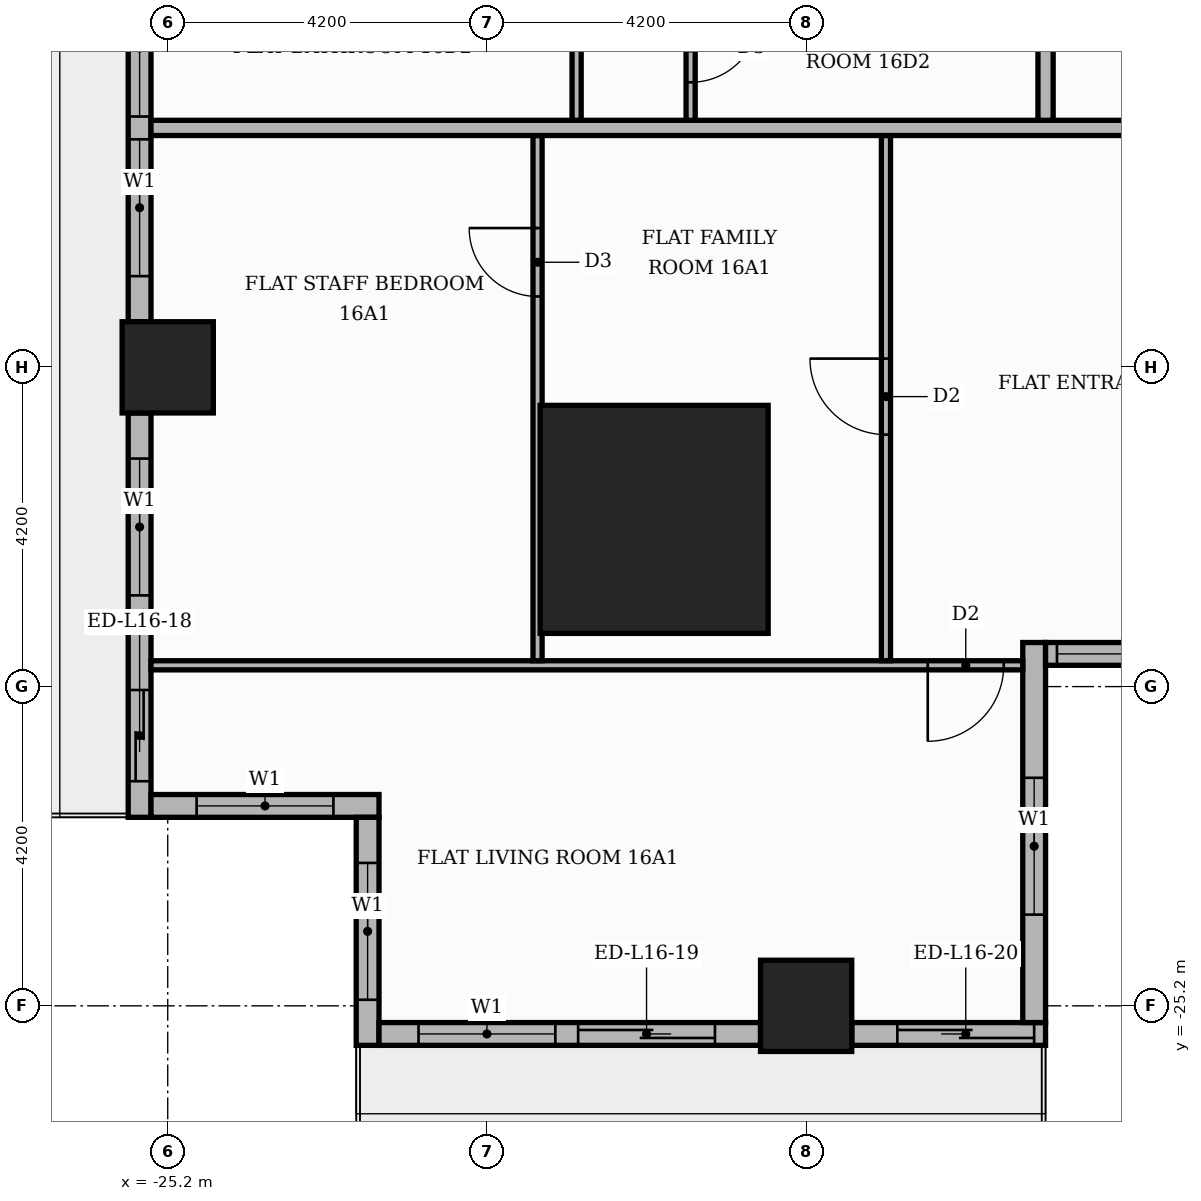
"""IFC4 building model, lengths in metres.
Left out: names, types, materials, properties, quantities, classifications, styles, units other than length and angle.
Written with IfcOpenShell. Run it as: python <this file> out.ifc"""

import sys

from ifc_helpers import new_model, si_unit, direction, frame, frame_2d, origin, origin_2d, place, context, subcontext, project, spatial, rectangle, extrude, element, fill, save


model = new_model("IFC4")
c1 = context("Model", 3, precision=1e-05, world=origin(), true_north=direction((0.0, 1.0)))
c2 = subcontext(c1, "Body", "Model", "MODEL_VIEW")
j1 = project(units=[si_unit("LENGTHUNIT", "METRE"), si_unit("PLANEANGLEUNIT", "RADIAN")], contexts=[c1])
p1 = place(None, origin())
s1 = spatial("IfcSite", under=j1, at=p1, CompositionType="ELEMENT")
p2 = place(p1, origin())
s2 = spatial("IfcBuilding", under=s1, at=p2, CompositionType="ELEMENT")
p3 = place(p2, frame((0.0, 0.0, 69.9)))
s3 = spatial("IfcBuildingStorey", under=s2, at=p3, CompositionType="ELEMENT", Elevation=69.9)
p4 = place(p3, frame((-18.8, -18.8, 0.0), z_axis=(0.0, 0.0, 1.0), x_axis=(1.0, 0.0, 0.0)))
e1 = element("IfcColumn", 1, at=p4, inside=s3, PredefinedType="COLUMN", context=c2, shape_type="SweptSolid", body=[
    extrude(rectangle(XDim=3.0, YDim=3.0, at=origin_2d()), origin(), (0.0, 0.0, 1.0), 3.9),
])
for number, where, z_axis, x_axis in (
    (2, (-16.8, -25.2, 0.0), (0.0, 0.0, 1.0), (1.0, 0.0, 0.0)),
    (3, (-25.2, -16.8, 0.0), (0.0, 0.0, 1.0), (1.0, 0.0, 0.0)),
):
    element("IfcColumn", number, at=place(p3, frame(where, z_axis=z_axis, x_axis=x_axis)), inside=s3, PredefinedType="COLUMN", context=c2, shape_type="SweptSolid", body=[
        extrude(rectangle(XDim=1.2, YDim=1.2, at=origin_2d()), origin(), (0.0, 0.0, 1.0), 3.9),
    ])
p5 = place(p3, frame((-25.57, -9.0, 0.0), z_axis=(0.0, 0.0, 1.0), x_axis=(0.0, -1.0, 0.0)))
e4 = element("IfcWall", 4, at=p5, inside=s3, PredefinedType="STANDARD", context=c2, shape_type="SweptSolid", body=[
    extrude(rectangle(XDim=7.2, YDim=0.3, at=frame_2d((3.6, 0.0))), origin(), (0.0, 0.0, 1.0), 3.4),
])
p6 = place(p5, frame((0.6, 0.0, 0.9)))
e5 = element("IfcOpeningElement", 5, at=p6, cuts=e4, PredefinedType="OPENING", context=c2, shape_type="SweptSolid", body=[
    extrude(rectangle(XDim=1.8, YDim=2.1, at=frame_2d((0.9, 1.05))), frame((0.0, 0.16, 0.0), z_axis=(0.0, -1.0, 0.0), x_axis=(1.0, 0.0, 0.0)), (0.0, 0.0, 1.0), 0.32),
])
p7 = place(p5, frame((2.7, 0.0, 0.9)))
e6 = element("IfcOpeningElement", 6, at=p7, cuts=e4, PredefinedType="OPENING", context=c2, shape_type="SweptSolid", body=[
    extrude(rectangle(XDim=1.8, YDim=2.1, at=frame_2d((0.9, 1.05))), frame((0.0, 0.16, 0.0), z_axis=(0.0, -1.0, 0.0), x_axis=(1.0, 0.0, 0.0)), (0.0, 0.0, 1.0), 0.32),
])
p8 = place(p5, frame((4.8, 0.0, 0.9)))
e7 = element("IfcOpeningElement", 7, at=p8, cuts=e4, PredefinedType="OPENING", context=c2, shape_type="SweptSolid", body=[
    extrude(rectangle(XDim=1.8, YDim=2.1, at=frame_2d((0.9, 1.05))), frame((0.0, 0.16, 0.0), z_axis=(0.0, -1.0, 0.0), x_axis=(1.0, 0.0, 0.0)), (0.0, 0.0, 1.0), 0.32),
])
p9 = place(p3, frame((-25.57, -17.4, 0.0), z_axis=(0.0, 0.0, 1.0), x_axis=(0.0, -1.0, 0.0)))
e8 = element("IfcWall", 8, at=p9, inside=s3, PredefinedType="STANDARD", context=c2, shape_type="SweptSolid", body=[
    extrude(rectangle(XDim=5.32, YDim=0.3, at=frame_2d((2.66, 0.0))), origin(), (0.0, 0.0, 1.0), 3.4),
])
p10 = place(p9, frame((0.6, 0.0, 0.9)))
e9 = element("IfcOpeningElement", 9, at=p10, cuts=e8, PredefinedType="OPENING", context=c2, shape_type="SweptSolid", body=[
    extrude(rectangle(XDim=1.8, YDim=2.1, at=frame_2d((0.9, 1.05))), frame((0.0, 0.16, 0.0), z_axis=(0.0, -1.0, 0.0), x_axis=(1.0, 0.0, 0.0)), (0.0, 0.0, 1.0), 0.32),
])
p11 = place(p9, frame((3.645, 0.0, 0.0)))
e10 = element("IfcOpeningElement", 10, at=p11, cuts=e8, PredefinedType="OPENING", context=c2, shape_type="SweptSolid", body=[
    extrude(rectangle(XDim=1.2, YDim=2.4, at=frame_2d((0.6, 1.2))), frame((0.0, 0.16, 0.0), z_axis=(0.0, -1.0, 0.0), x_axis=(1.0, 0.0, 0.0)), (0.0, 0.0, 1.0), 0.32),
])
p12 = place(p3, frame((-25.42, -22.57, 0.0), z_axis=(0.0, 0.0, 1.0), x_axis=(1.0, 0.0, 0.0)))
e11 = element("IfcWall", 11, at=p12, inside=s3, PredefinedType="STANDARD", context=c2, shape_type="SweptSolid", body=[
    extrude(rectangle(XDim=3.0, YDim=0.3, at=frame_2d((1.5, 0.0))), origin(), (0.0, 0.0, 1.0), 3.4),
])
p13 = place(p12, frame((0.6, 0.0, 0.9)))
e12 = element("IfcOpeningElement", 12, at=p13, cuts=e11, PredefinedType="OPENING", context=c2, shape_type="SweptSolid", body=[
    extrude(rectangle(XDim=1.8, YDim=2.1, at=frame_2d((0.9, 1.05))), frame((0.0, 0.16, 0.0), z_axis=(0.0, -1.0, 0.0), x_axis=(1.0, 0.0, 0.0)), (0.0, 0.0, 1.0), 0.32),
])
p14 = place(p3, frame((-22.57, -22.72, 0.0), z_axis=(0.0, 0.0, 1.0), x_axis=(0.0, -1.0, 0.0)))
e13 = element("IfcWall", 13, at=p14, inside=s3, PredefinedType="STANDARD", context=c2, shape_type="SweptSolid", body=[
    extrude(rectangle(XDim=3.0, YDim=0.3, at=frame_2d((1.5, 0.0))), origin(), (0.0, 0.0, 1.0), 3.4),
])
p15 = place(p14, frame((0.6, 0.0, 0.9)))
e14 = element("IfcOpeningElement", 14, at=p15, cuts=e13, PredefinedType="OPENING", context=c2, shape_type="SweptSolid", body=[
    extrude(rectangle(XDim=1.8, YDim=2.1, at=frame_2d((0.9, 1.05))), frame((0.0, 0.16, 0.0), z_axis=(0.0, -1.0, 0.0), x_axis=(1.0, 0.0, 0.0)), (0.0, 0.0, 1.0), 0.32),
])
p16 = place(p3, frame((-22.42, -25.57, 0.0), z_axis=(0.0, 0.0, 1.0), x_axis=(1.0, 0.0, 0.0)))
e15 = element("IfcWall", 15, at=p16, inside=s3, PredefinedType="STANDARD", context=c2, shape_type="SweptSolid", body=[
    extrude(rectangle(XDim=5.02, YDim=0.3, at=frame_2d((2.51, 0.0))), origin(), (0.0, 0.0, 1.0), 3.4),
])
p17 = place(p16, frame((0.52, 0.0, 0.9)))
e16 = element("IfcOpeningElement", 16, at=p17, cuts=e15, PredefinedType="OPENING", context=c2, shape_type="SweptSolid", body=[
    extrude(rectangle(XDim=1.8, YDim=2.1, at=frame_2d((0.9, 1.05))), frame((0.0, 0.16, 0.0), z_axis=(0.0, -1.0, 0.0), x_axis=(1.0, 0.0, 0.0)), (0.0, 0.0, 1.0), 0.32),
])
p18 = place(p16, frame((2.62, 0.0, 0.0)))
e17 = element("IfcOpeningElement", 17, at=p18, cuts=e15, PredefinedType="OPENING", context=c2, shape_type="SweptSolid", body=[
    extrude(rectangle(XDim=1.8, YDim=2.4, at=frame_2d((0.9, 1.2))), frame((0.0, 0.16, 0.0), z_axis=(0.0, -1.0, 0.0), x_axis=(1.0, 0.0, 0.0)), (0.0, 0.0, 1.0), 0.32),
])
p19 = place(p3, frame((-16.2, -25.57, 0.0), z_axis=(0.0, 0.0, 1.0), x_axis=(1.0, 0.0, 0.0)))
e18 = element("IfcWall", 18, at=p19, inside=s3, PredefinedType="STANDARD", context=c2, shape_type="SweptSolid", body=[
    extrude(rectangle(XDim=2.55, YDim=0.3, at=frame_2d((1.275, 0.0))), origin(), (0.0, 0.0, 1.0), 3.4),
])
p20 = place(p19, frame((0.6, 0.0, 0.0)))
e19 = element("IfcOpeningElement", 19, at=p20, cuts=e18, PredefinedType="OPENING", context=c2, shape_type="SweptSolid", body=[
    extrude(rectangle(XDim=1.8, YDim=2.4, at=frame_2d((0.9, 1.2))), frame((0.0, 0.16, 0.0), z_axis=(0.0, -1.0, 0.0), x_axis=(1.0, 0.0, 0.0)), (0.0, 0.0, 1.0), 0.32),
])
p21 = place(p3, frame((-13.8, -25.42, 0.0), z_axis=(0.0, 0.0, 1.0), x_axis=(0.0, 1.0, 0.0)))
e20 = element("IfcWall", 20, at=p21, inside=s3, PredefinedType="STANDARD", context=c2, shape_type="SweptSolid", body=[
    extrude(rectangle(XDim=5.0, YDim=0.3, at=frame_2d((2.5, 0.0))), origin(), (0.0, 0.0, 1.0), 3.4),
])
p22 = place(p21, frame((1.42, 0.0, 0.9)))
e21 = element("IfcOpeningElement", 21, at=p22, cuts=e20, PredefinedType="OPENING", context=c2, shape_type="SweptSolid", body=[
    extrude(rectangle(XDim=1.8, YDim=2.1, at=frame_2d((0.9, 1.05))), frame((0.0, 0.16, 0.0), z_axis=(0.0, -1.0, 0.0), x_axis=(1.0, 0.0, 0.0)), (0.0, 0.0, 1.0), 0.32),
])
p23 = place(p3, frame((-13.65, -20.57, 0.0), z_axis=(0.0, 0.0, 1.0), x_axis=(1.0, 0.0, 0.0)))
e22 = element("IfcWall", 22, at=p23, inside=s3, PredefinedType="STANDARD", context=c2, shape_type="SweptSolid", body=[
    extrude(rectangle(XDim=27.6, YDim=0.3, at=frame_2d((13.8, 0.0))), origin(), (0.0, 0.0, 1.0), 3.4),
])
p24 = place(p23, frame((0.15, 0.0, 0.9)))
e23 = element("IfcOpeningElement", 23, at=p24, cuts=e22, PredefinedType="OPENING", context=c2, shape_type="SweptSolid", body=[
    extrude(rectangle(XDim=6.0, YDim=2.1, at=frame_2d((3.0, 1.05))), frame((0.0, 0.16, 0.0), z_axis=(0.0, -1.0, 0.0), x_axis=(1.0, 0.0, 0.0)), (0.0, 0.0, 1.0), 0.32),
])
p25 = place(p23, frame((6.45, 0.0, 0.9)))
e24 = element("IfcOpeningElement", 24, at=p25, cuts=e22, PredefinedType="OPENING", context=c2, shape_type="SweptSolid", body=[
    extrude(rectangle(XDim=1.8, YDim=2.1, at=frame_2d((0.9, 1.05))), frame((0.0, 0.16, 0.0), z_axis=(0.0, -1.0, 0.0), x_axis=(1.0, 0.0, 0.0)), (0.0, 0.0, 1.0), 0.32),
])
p26 = place(p23, frame((8.55, 0.0, 0.9)))
e25 = element("IfcOpeningElement", 25, at=p26, cuts=e22, PredefinedType="OPENING", context=c2, shape_type="SweptSolid", body=[
    extrude(rectangle(XDim=6.0, YDim=2.1, at=frame_2d((3.0, 1.05))), frame((0.0, 0.16, 0.0), z_axis=(0.0, -1.0, 0.0), x_axis=(1.0, 0.0, 0.0)), (0.0, 0.0, 1.0), 0.32),
])
p27 = place(p23, frame((14.85, 0.0, 0.9)))
e26 = element("IfcOpeningElement", 26, at=p27, cuts=e22, PredefinedType="OPENING", context=c2, shape_type="SweptSolid", body=[
    extrude(rectangle(XDim=6.0, YDim=2.1, at=frame_2d((3.0, 1.05))), frame((0.0, 0.16, 0.0), z_axis=(0.0, -1.0, 0.0), x_axis=(1.0, 0.0, 0.0)), (0.0, 0.0, 1.0), 0.32),
])
p28 = place(p23, frame((21.15, 0.0, 0.9)))
e27 = element("IfcOpeningElement", 27, at=p28, cuts=e22, PredefinedType="OPENING", context=c2, shape_type="SweptSolid", body=[
    extrude(rectangle(XDim=6.0, YDim=2.1, at=frame_2d((3.0, 1.05))), frame((0.0, 0.16, 0.0), z_axis=(0.0, -1.0, 0.0), x_axis=(1.0, 0.0, 0.0)), (0.0, 0.0, 1.0), 0.32),
])
p29 = place(p3, frame((-25.42, -20.72, 0.0), z_axis=(0.0, 0.0, 1.0), x_axis=(1.0, 0.0, 0.0)))
e28 = element("IfcWall", 28, at=p29, inside=s3, PredefinedType="PARTITIONING", context=c2, shape_type="SweptSolid", body=[
    extrude(rectangle(XDim=11.47, YDim=0.12, at=frame_2d((5.735, 0.0))), origin(), (0.0, 0.0, 1.0), 3.4),
])
p30 = place(p29, frame((10.22, 0.0, 0.0)))
e29 = element("IfcOpeningElement", 29, at=p30, cuts=e28, PredefinedType="OPENING", context=c2, shape_type="SweptSolid", body=[
    extrude(rectangle(XDim=1.0, YDim=2.1, at=frame_2d((0.5, 1.05))), frame((0.0, 0.07, 0.0), z_axis=(0.0, -1.0, 0.0), x_axis=(1.0, 0.0, 0.0)), (0.0, 0.0, 1.0), 0.14),
])
p31 = place(p3, frame((-20.334, -20.66, 0.0), z_axis=(0.0, 0.0, 1.0), x_axis=(0.0, 1.0, 0.0)))
e30 = element("IfcWall", 30, at=p31, inside=s3, PredefinedType="PARTITIONING", context=c2, shape_type="SweptSolid", body=[
    extrude(rectangle(XDim=6.91, YDim=0.12, at=frame_2d((3.455, 0.0))), origin(), (0.0, 0.0, 1.0), 3.4),
])
p32 = place(p31, frame((4.792, 0.0, 0.0)))
e31 = element("IfcOpeningElement", 31, at=p32, cuts=e30, PredefinedType="OPENING", context=c2, shape_type="SweptSolid", body=[
    extrude(rectangle(XDim=0.9, YDim=2.1, at=frame_2d((0.45, 1.05))), frame((0.0, 0.07, 0.0), z_axis=(0.0, -1.0, 0.0), x_axis=(1.0, 0.0, 0.0)), (0.0, 0.0, 1.0), 0.14),
])
p33 = place(p3, frame((-15.75, -20.66, 0.0), z_axis=(0.0, 0.0, 1.0), x_axis=(0.0, 1.0, 0.0)))
e32 = element("IfcWall", 32, at=p33, inside=s3, PredefinedType="PARTITIONING", context=c2, shape_type="SweptSolid", body=[
    extrude(rectangle(XDim=6.91, YDim=0.12, at=frame_2d((3.455, 0.0))), origin(), (0.0, 0.0, 1.0), 3.4),
])
p34 = place(p33, frame((2.975, 0.0, 0.0)))
e33 = element("IfcOpeningElement", 33, at=p34, cuts=e32, PredefinedType="OPENING", context=c2, shape_type="SweptSolid", body=[
    extrude(rectangle(XDim=1.0, YDim=2.1, at=frame_2d((0.5, 1.05))), frame((0.0, 0.07, 0.0), z_axis=(0.0, -1.0, 0.0), x_axis=(1.0, 0.0, 0.0)), (0.0, 0.0, 1.0), 0.14),
])
p35 = place(p3, frame((-25.42, -13.65, 0.0), z_axis=(0.0, 0.0, 1.0), x_axis=(1.0, 0.0, 0.0)))
e34 = element("IfcWall", 34, at=p35, inside=s3, PredefinedType="PARTITIONING", context=c2, shape_type="SweptSolid", body=[
    extrude(rectangle(XDim=39.07, YDim=0.2, at=frame_2d((19.535, 0.0))), origin(), (0.0, 0.0, 1.0), 3.4),
])
p36 = place(p35, frame((13.32, 0.0, 0.0)))
e35 = element("IfcOpeningElement", 35, at=p36, cuts=e34, PredefinedType="OPENING", context=c2, shape_type="SweptSolid", body=[
    extrude(rectangle(XDim=1.1, YDim=2.4, at=frame_2d((0.55, 1.2))), frame((0.0, 0.11, 0.0), z_axis=(0.0, -1.0, 0.0), x_axis=(1.0, 0.0, 0.0)), (0.0, 0.0, 1.0), 0.22),
])
p37 = place(p35, frame((21.72, 0.0, 0.0)))
e36 = element("IfcOpeningElement", 36, at=p37, cuts=e34, PredefinedType="OPENING", context=c2, shape_type="SweptSolid", body=[
    extrude(rectangle(XDim=1.1, YDim=2.4, at=frame_2d((0.55, 1.2))), frame((0.0, 0.11, 0.0), z_axis=(0.0, -1.0, 0.0), x_axis=(1.0, 0.0, 0.0)), (0.0, 0.0, 1.0), 0.22),
])
p38 = place(p3, frame((-19.82, -13.55, 0.0), z_axis=(0.0, 0.0, 1.0), x_axis=(0.0, 1.0, 0.0)))
e37 = element("IfcWall", 37, at=p38, inside=s3, PredefinedType="PARTITIONING", context=c2, shape_type="SweptSolid", body=[
    extrude(rectangle(XDim=1.94, YDim=0.12, at=frame_2d((0.97, 0.0))), origin(), (0.0, 0.0, 1.0), 3.4),
])
p39 = place(p3, frame((-18.32, -13.55, 0.0), z_axis=(0.0, 0.0, 1.0), x_axis=(0.0, 1.0, 0.0)))
e38 = element("IfcWall", 38, at=p39, inside=s3, PredefinedType="PARTITIONING", context=c2, shape_type="SweptSolid", body=[
    extrude(rectangle(XDim=1.94, YDim=0.12, at=frame_2d((0.97, 0.0))), origin(), (0.0, 0.0, 1.0), 3.4),
])
p40 = place(p39, frame((0.5, 0.0, 0.0)))
e39 = element("IfcOpeningElement", 39, at=p40, cuts=e38, PredefinedType="OPENING", context=c2, shape_type="SweptSolid", body=[
    extrude(rectangle(XDim=0.9, YDim=2.1, at=frame_2d((0.45, 1.05))), frame((0.0, 0.07, 0.0), z_axis=(0.0, -1.0, 0.0), x_axis=(1.0, 0.0, 0.0)), (0.0, 0.0, 1.0), 0.14),
])
p41 = place(p3, frame((-13.65, -13.55, 0.0), z_axis=(0.0, 0.0, 1.0), x_axis=(0.0, 1.0, 0.0)))
e40 = element("IfcWall", 40, at=p41, inside=s3, PredefinedType="PARTITIONING", context=c2, shape_type="SweptSolid", body=[
    extrude(rectangle(XDim=18.7, YDim=0.2, at=frame_2d((9.35, 0.0))), origin(), (0.0, 0.0, 1.0), 3.4),
])
p42 = place(p41, frame((11.95, 0.0, 0.0)))
e41 = element("IfcOpeningElement", 41, at=p42, cuts=e40, PredefinedType="OPENING", context=c2, shape_type="SweptSolid", body=[
    extrude(rectangle(XDim=1.1, YDim=2.4, at=frame_2d((0.55, 1.2))), frame((0.0, 0.11, 0.0), z_axis=(0.0, -1.0, 0.0), x_axis=(1.0, 0.0, 0.0)), (0.0, 0.0, 1.0), 0.22),
])
p43 = place(p7, origin())
e42 = element("IfcWindow", 42, at=p43, inside=s3, PartitioningType="SINGLE_PANEL", PredefinedType="WINDOW", context=c2, shape_type="SweptSolid", body=[
    extrude(rectangle(XDim=1.8, YDim=2.1, at=frame_2d((0.9, 1.05))), frame((0.0, 0.03, 0.0), z_axis=(0.0, -1.0, 0.0), x_axis=(1.0, 0.0, 0.0)), (0.0, 0.0, 1.0), 0.06),
])
fill(e6, e42)
p44 = place(p8, origin())
e43 = element("IfcWindow", 43, at=p44, inside=s3, PartitioningType="SINGLE_PANEL", PredefinedType="WINDOW", context=c2, shape_type="SweptSolid", body=[
    extrude(rectangle(XDim=1.8, YDim=2.1, at=frame_2d((0.9, 1.05))), frame((0.0, 0.03, 0.0), z_axis=(0.0, -1.0, 0.0), x_axis=(1.0, 0.0, 0.0)), (0.0, 0.0, 1.0), 0.06),
])
fill(e7, e43)
p45 = place(p10, origin())
e44 = element("IfcWindow", 44, at=p45, inside=s3, PartitioningType="SINGLE_PANEL", PredefinedType="WINDOW", context=c2, shape_type="SweptSolid", body=[
    extrude(rectangle(XDim=1.8, YDim=2.1, at=frame_2d((0.9, 1.05))), frame((0.0, 0.03, 0.0), z_axis=(0.0, -1.0, 0.0), x_axis=(1.0, 0.0, 0.0)), (0.0, 0.0, 1.0), 0.06),
])
fill(e9, e44)
p46 = place(p11, origin())
e45 = element("IfcDoor", 45, at=p46, inside=s3, OperationType="SLIDING_TO_RIGHT", PredefinedType="DOOR", context=c2, shape_type="SweptSolid", body=[
    extrude(rectangle(XDim=1.2, YDim=2.4, at=frame_2d((0.6, 1.2))), frame((0.0, 0.025, 0.0), z_axis=(0.0, -1.0, 0.0), x_axis=(1.0, 0.0, 0.0)), (0.0, 0.0, 1.0), 0.05),
])
fill(e10, e45)
p47 = place(p13, origin())
e46 = element("IfcWindow", 46, at=p47, inside=s3, PartitioningType="SINGLE_PANEL", PredefinedType="WINDOW", context=c2, shape_type="SweptSolid", body=[
    extrude(rectangle(XDim=1.8, YDim=2.1, at=frame_2d((0.9, 1.05))), frame((0.0, 0.03, 0.0), z_axis=(0.0, -1.0, 0.0), x_axis=(1.0, 0.0, 0.0)), (0.0, 0.0, 1.0), 0.06),
])
fill(e12, e46)
p48 = place(p15, origin())
e47 = element("IfcWindow", 47, at=p48, inside=s3, PartitioningType="SINGLE_PANEL", PredefinedType="WINDOW", context=c2, shape_type="SweptSolid", body=[
    extrude(rectangle(XDim=1.8, YDim=2.1, at=frame_2d((0.9, 1.05))), frame((0.0, 0.03, 0.0), z_axis=(0.0, -1.0, 0.0), x_axis=(1.0, 0.0, 0.0)), (0.0, 0.0, 1.0), 0.06),
])
fill(e14, e47)
p49 = place(p17, origin())
e48 = element("IfcWindow", 48, at=p49, inside=s3, PartitioningType="SINGLE_PANEL", PredefinedType="WINDOW", context=c2, shape_type="SweptSolid", body=[
    extrude(rectangle(XDim=1.8, YDim=2.1, at=frame_2d((0.9, 1.05))), frame((0.0, 0.03, 0.0), z_axis=(0.0, -1.0, 0.0), x_axis=(1.0, 0.0, 0.0)), (0.0, 0.0, 1.0), 0.06),
])
fill(e16, e48)
p50 = place(p18, origin())
e49 = element("IfcDoor", 49, at=p50, inside=s3, OperationType="SLIDING_TO_RIGHT", PredefinedType="DOOR", context=c2, shape_type="SweptSolid", body=[
    extrude(rectangle(XDim=1.8, YDim=2.4, at=frame_2d((0.9, 1.2))), frame((0.0, 0.025, 0.0), z_axis=(0.0, -1.0, 0.0), x_axis=(1.0, 0.0, 0.0)), (0.0, 0.0, 1.0), 0.05),
])
fill(e17, e49)
p51 = place(p20, origin())
e50 = element("IfcDoor", 50, at=p51, inside=s3, OperationType="SLIDING_TO_LEFT", PredefinedType="DOOR", context=c2, shape_type="SweptSolid", body=[
    extrude(rectangle(XDim=1.8, YDim=2.4, at=frame_2d((0.9, 1.2))), frame((0.0, 0.025, 0.0), z_axis=(0.0, -1.0, 0.0), x_axis=(1.0, 0.0, 0.0)), (0.0, 0.0, 1.0), 0.05),
])
fill(e19, e50)
p52 = place(p22, origin())
e51 = element("IfcWindow", 51, at=p52, inside=s3, PartitioningType="SINGLE_PANEL", PredefinedType="WINDOW", context=c2, shape_type="SweptSolid", body=[
    extrude(rectangle(XDim=1.8, YDim=2.1, at=frame_2d((0.9, 1.05))), frame((0.0, 0.03, 0.0), z_axis=(0.0, -1.0, 0.0), x_axis=(1.0, 0.0, 0.0)), (0.0, 0.0, 1.0), 0.06),
])
fill(e21, e51)
p53 = place(p24, origin())
e52 = element("IfcWindow", 52, at=p53, inside=s3, PartitioningType="SINGLE_PANEL", PredefinedType="WINDOW", context=c2, shape_type="SweptSolid", body=[
    extrude(rectangle(XDim=6.0, YDim=2.1, at=frame_2d((3.0, 1.05))), frame((0.0, 0.03, 0.0), z_axis=(0.0, -1.0, 0.0), x_axis=(1.0, 0.0, 0.0)), (0.0, 0.0, 1.0), 0.06),
])
fill(e23, e52)
p54 = place(p32, origin())
e53 = element("IfcDoor", 53, at=p54, inside=s3, OperationType="SINGLE_SWING_RIGHT", PredefinedType="DOOR", context=c2, shape_type="SweptSolid", body=[
    extrude(rectangle(XDim=0.9, YDim=2.1, at=frame_2d((0.45, 1.05))), frame((0.0, 0.025, 0.0), z_axis=(0.0, -1.0, 0.0), x_axis=(1.0, 0.0, 0.0)), (0.0, 0.0, 1.0), 0.05),
])
fill(e31, e53)
p55 = place(p34, origin())
e54 = element("IfcDoor", 54, at=p55, inside=s3, OperationType="SINGLE_SWING_RIGHT", PredefinedType="DOOR", context=c2, shape_type="SweptSolid", body=[
    extrude(rectangle(XDim=1.0, YDim=2.1, at=frame_2d((0.5, 1.05))), frame((0.0, 0.025, 0.0), z_axis=(0.0, -1.0, 0.0), x_axis=(1.0, 0.0, 0.0)), (0.0, 0.0, 1.0), 0.05),
])
fill(e33, e54)
p56 = place(p30, frame((1.0, 0.0, 0.0), z_axis=(0.0, 0.0, 1.0), x_axis=(-1.0, 0.0, 0.0)))
e55 = element("IfcDoor", 55, at=p56, inside=s3, OperationType="SINGLE_SWING_LEFT", PredefinedType="DOOR", context=c2, shape_type="SweptSolid", body=[
    extrude(rectangle(XDim=1.0, YDim=2.1, at=frame_2d((0.5, 1.05))), frame((0.0, 0.025, 0.0), z_axis=(0.0, -1.0, 0.0), x_axis=(1.0, 0.0, 0.0)), (0.0, 0.0, 1.0), 0.05),
])
fill(e29, e55)
p57 = place(p40, frame((0.9, 0.0, 0.0), z_axis=(0.0, 0.0, 1.0), x_axis=(-1.0, 0.0, 0.0)))
e56 = element("IfcDoor", 56, at=p57, inside=s3, OperationType="SINGLE_SWING_RIGHT", PredefinedType="DOOR", context=c2, shape_type="SweptSolid", body=[
    extrude(rectangle(XDim=0.9, YDim=2.1, at=frame_2d((0.45, 1.05))), frame((0.0, 0.025, 0.0), z_axis=(0.0, -1.0, 0.0), x_axis=(1.0, 0.0, 0.0)), (0.0, 0.0, 1.0), 0.05),
])
fill(e39, e56)
save(model, sys.argv[1])
